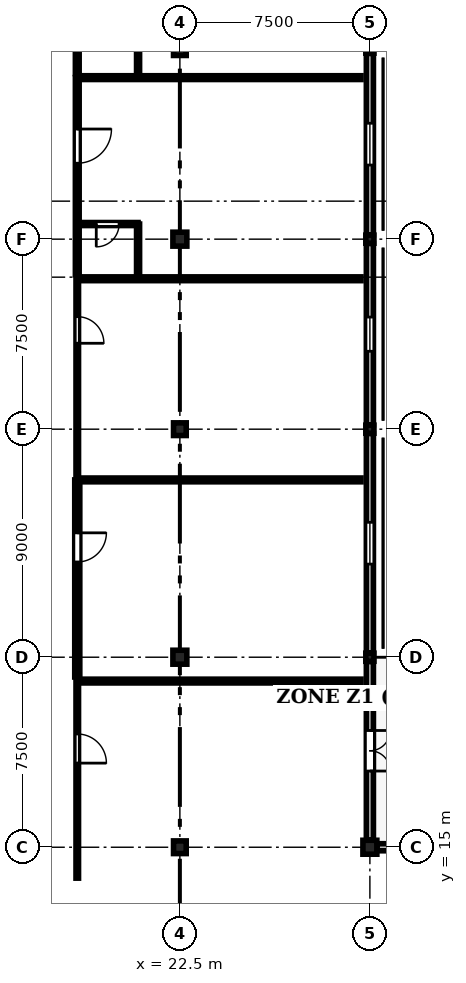
"""IFC4 building model, lengths in metres.
Left out: names, types, materials, properties, quantities, classifications, styles, units other than length and angle.
Written with IfcOpenShell. Run it as: python <this file> out.ifc"""

import sys

from ifc_helpers import new_model, si_unit, direction, frame, frame_2d, origin, origin_2d, place, context, subcontext, project, spatial, rectangle, extrude, element, fill, save


model = new_model("IFC4")
c1 = context("Model", 3, precision=1e-05, world=origin(), true_north=direction((0.0, 1.0)))
c2 = subcontext(c1, "Body", "Model", "MODEL_VIEW")
j1 = project(units=[si_unit("LENGTHUNIT", "METRE"), si_unit("PLANEANGLEUNIT", "RADIAN")], contexts=[c1])
p1 = place(None, origin())
s1 = spatial("IfcSite", under=j1, at=p1, CompositionType="ELEMENT")
p2 = place(p1, origin())
s2 = spatial("IfcBuilding", under=s1, at=p2, CompositionType="ELEMENT")
p3 = place(p2, frame((0.0, 0.0, 25.95)))
s3 = spatial("IfcBuildingStorey", under=s2, at=p3, CompositionType="ELEMENT", Elevation=25.95)
p4 = place(p3, frame((22.5, 15.0, 0.0), z_axis=(0.0, 0.0, 1.0), x_axis=(1.0, 0.0, 0.0)))
e1 = element("IfcColumn", 1, at=p4, inside=s3, PredefinedType="COLUMN", context=c2, shape_type="SweptSolid", body=[
    extrude(rectangle(XDim=0.5, YDim=0.5, at=origin_2d()), origin(), (0.0, 0.0, 1.0), 4.05),
])
p5 = place(p3, frame((22.5, 22.5, 0.0), z_axis=(0.0, 0.0, 1.0), x_axis=(1.0, 0.0, 0.0)))
e2 = element("IfcColumn", 2, at=p5, inside=s3, PredefinedType="COLUMN", context=c2, shape_type="SweptSolid", body=[
    extrude(rectangle(XDim=0.55, YDim=0.55, at=origin_2d()), origin(), (0.0, 0.0, 1.0), 4.05),
])
p6 = place(p3, frame((22.5, 31.5, 0.0), z_axis=(0.0, 0.0, 1.0), x_axis=(1.0, 0.0, 0.0)))
e3 = element("IfcColumn", 3, at=p6, inside=s3, PredefinedType="COLUMN", context=c2, shape_type="SweptSolid", body=[
    extrude(rectangle(XDim=0.5, YDim=0.5, at=origin_2d()), origin(), (0.0, 0.0, 1.0), 4.05),
])
p7 = place(p3, frame((22.5, 39.0, 0.0), z_axis=(0.0, 0.0, 1.0), x_axis=(1.0, 0.0, 0.0)))
e4 = element("IfcColumn", 4, at=p7, inside=s3, PredefinedType="COLUMN", context=c2, shape_type="SweptSolid", body=[
    extrude(rectangle(XDim=0.55, YDim=0.55, at=origin_2d()), origin(), (0.0, 0.0, 1.0), 4.05),
])
p8 = place(p3, frame((22.5, 46.5, 0.0), z_axis=(0.0, 0.0, 1.0), x_axis=(1.0, 0.0, 0.0)))
e5 = element("IfcColumn", 5, at=p8, inside=s3, PredefinedType="COLUMN", context=c2, shape_type="SweptSolid", body=[
    extrude(rectangle(XDim=0.5, YDim=0.5, at=origin_2d()), origin(), (0.0, 0.0, 1.0), 4.05),
])
p9 = place(p3, frame((30.0, 15.0, 0.0), z_axis=(0.0, 0.0, 1.0), x_axis=(1.0, 0.0, 0.0)))
e6 = element("IfcColumn", 6, at=p9, inside=s3, PredefinedType="COLUMN", context=c2, shape_type="SweptSolid", body=[
    extrude(rectangle(XDim=0.55, YDim=0.55, at=origin_2d()), origin(), (0.0, 0.0, 1.0), 4.05),
])
for number, where, z_axis, x_axis in (
    (7, (30.0, 22.5, 0.0), (0.0, 0.0, 1.0), (1.0, 0.0, 0.0)),
    (8, (30.0, 31.5, 0.0), (0.0, 0.0, 1.0), (1.0, 0.0, 0.0)),
    (9, (30.0, 39.0, 0.0), (0.0, 0.0, 1.0), (1.0, 0.0, 0.0)),
    (10, (30.0, 46.5, 0.0), (0.0, 0.0, 1.0), (1.0, 0.0, 0.0)),
):
    element("IfcColumn", number, at=place(p3, frame(where, z_axis=z_axis, x_axis=x_axis)), inside=s3, PredefinedType="COLUMN", context=c2, shape_type="SweptSolid", body=[
        extrude(rectangle(XDim=0.32, YDim=0.32, at=origin_2d()), origin(), (0.0, 0.0, 1.0), 4.05),
    ])
p10 = place(p3, frame((30.0, 22.33, 0.0), z_axis=(0.0, 0.0, 1.0), x_axis=(0.0, -1.0, 0.0)))
e11 = element("IfcWall", 11, at=p10, inside=s3, PredefinedType="STANDARD", context=c2, shape_type="SweptSolid", body=[
    extrude(rectangle(XDim=7.045, YDim=0.28, at=frame_2d((3.522, 0.0))), origin(), (0.0, 0.0, 1.0), 3.17),
])
p11 = place(p10, frame((2.722, 0.0, 0.0)))
e12 = element("IfcOpeningElement", 12, at=p11, cuts=e11, PredefinedType="OPENING", context=c2, shape_type="SweptSolid", body=[
    extrude(rectangle(XDim=1.6, YDim=2.35, at=frame_2d((0.8, 1.175))), frame((0.0, 0.15, 0.0), z_axis=(0.0, -1.0, 0.0), x_axis=(1.0, 0.0, 0.0)), (0.0, 0.0, 1.0), 0.3),
])
p12 = place(p3, frame((30.0, 31.33, 0.0), z_axis=(0.0, 0.0, 1.0), x_axis=(0.0, -1.0, 0.0)))
e13 = element("IfcWall", 13, at=p12, inside=s3, PredefinedType="STANDARD", context=c2, shape_type="SweptSolid", body=[
    extrude(rectangle(XDim=8.66, YDim=0.28, at=frame_2d((4.33, 0.0))), origin(), (0.0, 0.0, 1.0), 3.22),
])
p13 = place(p12, frame((3.505, 0.0, 0.85)))
e14 = element("IfcOpeningElement", 14, at=p13, cuts=e13, PredefinedType="OPENING", context=c2, shape_type="SweptSolid", body=[
    extrude(rectangle(XDim=1.65, YDim=2.09, at=frame_2d((0.825, 1.045))), frame((0.0, 0.15, 0.0), z_axis=(0.0, -1.0, 0.0), x_axis=(1.0, 0.0, 0.0)), (0.0, 0.0, 1.0), 0.3),
])
p14 = place(p3, frame((30.0, 38.83, 0.0), z_axis=(0.0, 0.0, 1.0), x_axis=(0.0, -1.0, 0.0)))
e15 = element("IfcWall", 15, at=p14, inside=s3, PredefinedType="STANDARD", context=c2, shape_type="SweptSolid", body=[
    extrude(rectangle(XDim=7.16, YDim=0.28, at=frame_2d((3.58, 0.0))), origin(), (0.0, 0.0, 1.0), 3.17),
])
p15 = place(p14, frame((2.905, 0.0, 0.85)))
e16 = element("IfcOpeningElement", 16, at=p15, cuts=e15, PredefinedType="OPENING", context=c2, shape_type="SweptSolid", body=[
    extrude(rectangle(XDim=1.35, YDim=2.04, at=frame_2d((0.675, 1.02))), frame((0.0, 0.15, 0.0), z_axis=(0.0, -1.0, 0.0), x_axis=(1.0, 0.0, 0.0)), (0.0, 0.0, 1.0), 0.3),
])
p16 = place(p3, frame((30.0, 46.33, 0.0), z_axis=(0.0, 0.0, 1.0), x_axis=(0.0, -1.0, 0.0)))
e17 = element("IfcWall", 17, at=p16, inside=s3, PredefinedType="STANDARD", context=c2, shape_type="SweptSolid", body=[
    extrude(rectangle(XDim=7.16, YDim=0.28, at=frame_2d((3.58, 0.0))), origin(), (0.0, 0.0, 1.0), 3.17),
])
p17 = place(p16, frame((2.755, 0.0, 0.85)))
e18 = element("IfcOpeningElement", 18, at=p17, cuts=e17, PredefinedType="OPENING", context=c2, shape_type="SweptSolid", body=[
    extrude(rectangle(XDim=1.65, YDim=2.04, at=frame_2d((0.825, 1.02))), frame((0.0, 0.15, 0.0), z_axis=(0.0, -1.0, 0.0), x_axis=(1.0, 0.0, 0.0)), (0.0, 0.0, 1.0), 0.3),
])
p18 = place(p3, frame((30.285, 15.0, 0.0), z_axis=(0.0, 0.0, 1.0), x_axis=(1.0, 0.0, 0.0)))
e19 = element("IfcWall", 19, at=p18, inside=s3, PredefinedType="STANDARD", context=c2, shape_type="SweptSolid", body=[
    extrude(rectangle(XDim=6.98, YDim=0.28, at=frame_2d((3.49, 0.0))), origin(), (0.0, 0.0, 1.0), 3.17),
])
p19 = place(p18, frame((2.69, 0.0, 0.0)))
e20 = element("IfcOpeningElement", 20, at=p19, cuts=e19, PredefinedType="OPENING", context=c2, shape_type="SweptSolid", body=[
    extrude(rectangle(XDim=1.6, YDim=2.35, at=frame_2d((0.8, 1.175))), frame((0.0, 0.15, 0.0), z_axis=(0.0, -1.0, 0.0), x_axis=(1.0, 0.0, 0.0)), (0.0, 0.0, 1.0), 0.3),
])
p20 = place(p3, frame((18.45, 21.559, 0.0), z_axis=(0.0, 0.0, 1.0), x_axis=(0.0, -1.0, 0.0)))
e21 = element("IfcWall", 21, at=p20, inside=s3, PredefinedType="PARTITIONING", context=c2, shape_type="SweptSolid", body=[
    extrude(rectangle(XDim=7.779, YDim=0.1, at=frame_2d((3.889, 0.0))), origin(), (0.0, 0.0, 1.0), 3.755),
])
p21 = place(p20, frame((2.089, 0.0, 0.0)))
e22 = element("IfcOpeningElement", 22, at=p21, cuts=e21, PredefinedType="OPENING", context=c2, shape_type="SweptSolid", body=[
    extrude(rectangle(XDim=1.15, YDim=2.2, at=frame_2d((0.575, 1.1))), frame((0.0, 0.06, 0.0), z_axis=(0.0, -1.0, 0.0), x_axis=(1.0, 0.0, 0.0)), (0.0, 0.0, 1.0), 0.12),
])
p22 = place(p3, frame((18.45, 29.498, 0.0), z_axis=(0.0, 0.0, 1.0), x_axis=(0.0, -1.0, 0.0)))
e23 = element("IfcWall", 23, at=p22, inside=s3, PredefinedType="STANDARD", context=c2, shape_type="SweptSolid", body=[
    extrude(rectangle(XDim=7.779, YDim=0.2, at=frame_2d((3.889, 0.0))), origin(), (0.0, 0.0, 1.0), 3.355),
])
p23 = place(p22, frame((2.089, 0.0, 0.0)))
e24 = element("IfcOpeningElement", 24, at=p23, cuts=e23, PredefinedType="OPENING", context=c2, shape_type="SweptSolid", body=[
    extrude(rectangle(XDim=1.15, YDim=2.2, at=frame_2d((0.575, 1.1))), frame((0.0, 0.11, 0.0), z_axis=(0.0, -1.0, 0.0), x_axis=(1.0, 0.0, 0.0)), (0.0, 0.0, 1.0), 0.22),
])
p24 = place(p3, frame((18.45, 37.437, 0.0), z_axis=(0.0, 0.0, 1.0), x_axis=(0.0, -1.0, 0.0)))
e25 = element("IfcWall", 25, at=p24, inside=s3, PredefinedType="PARTITIONING", context=c2, shape_type="SweptSolid", body=[
    extrude(rectangle(XDim=7.779, YDim=0.1, at=frame_2d((3.89, 0.0))), origin(), (0.0, 0.0, 1.0), 3.355),
])
p25 = place(p24, frame((1.496, 0.0, 0.0)))
e26 = element("IfcOpeningElement", 26, at=p25, cuts=e25, PredefinedType="OPENING", context=c2, shape_type="SweptSolid", body=[
    extrude(rectangle(XDim=1.05, YDim=2.2, at=frame_2d((0.525, 1.1))), frame((0.0, 0.06, 0.0), z_axis=(0.0, -1.0, 0.0), x_axis=(1.0, 0.0, 0.0)), (0.0, 0.0, 1.0), 0.12),
])
p26 = place(p3, frame((18.45, 45.375, 0.0), z_axis=(0.0, 0.0, 1.0), x_axis=(0.0, -1.0, 0.0)))
e27 = element("IfcWall", 27, at=p26, inside=s3, PredefinedType="PARTITIONING", context=c2, shape_type="SweptSolid", body=[
    extrude(rectangle(XDim=7.779, YDim=0.15, at=frame_2d((3.889, 0.0))), origin(), (0.0, 0.0, 1.0), 3.755),
])
p27 = place(p26, frame((2.029, 0.0, 0.0)))
e28 = element("IfcOpeningElement", 28, at=p27, cuts=e27, PredefinedType="OPENING", context=c2, shape_type="SweptSolid", body=[
    extrude(rectangle(XDim=1.35, YDim=2.25, at=frame_2d((0.675, 1.125))), frame((0.0, 0.085, 0.0), z_axis=(0.0, -1.0, 0.0), x_axis=(1.0, 0.0, 0.0)), (0.0, 0.0, 1.0), 0.17),
])
p28 = place(p3, frame((20.85, 39.597, 0.0), z_axis=(0.0, 0.0, 1.0), x_axis=(-1.0, 0.0, 0.0)))
e29 = element("IfcWall", 29, at=p28, inside=s3, PredefinedType="PARTITIONING", context=c2, shape_type="SweptSolid", body=[
    extrude(rectangle(XDim=2.4, YDim=0.12, at=frame_2d((1.2, 0.0))), origin(), (0.0, 0.0, 1.0), 3.755),
])
p29 = place(p28, frame((0.75, 0.0, 0.0)))
e30 = element("IfcOpeningElement", 30, at=p29, cuts=e29, PredefinedType="OPENING", context=c2, shape_type="SweptSolid", body=[
    extrude(rectangle(XDim=0.9, YDim=2.1, at=frame_2d((0.45, 1.05))), frame((0.0, 0.07, 0.0), z_axis=(0.0, -1.0, 0.0), x_axis=(1.0, 0.0, 0.0)), (0.0, 0.0, 1.0), 0.14),
])
p30 = place(p3, frame((20.85, 37.597, 0.0), z_axis=(0.0, 0.0, 1.0), x_axis=(0.0, 1.0, 0.0)))
e31 = element("IfcWall", 31, at=p30, inside=s3, PredefinedType="PARTITIONING", context=c2, shape_type="SweptSolid", body=[
    extrude(rectangle(XDim=2.0, YDim=0.12, at=frame_2d((1.0, 0.0))), origin(), (0.0, 0.0, 1.0), 3.755),
])
p31 = place(p3, frame((18.45, 53.314, 0.0), z_axis=(0.0, 0.0, 1.0), x_axis=(0.0, -1.0, 0.0)))
e32 = element("IfcWall", 32, at=p31, inside=s3, PredefinedType="PARTITIONING", context=c2, shape_type="SweptSolid", body=[
    extrude(rectangle(XDim=7.779, YDim=0.15, at=frame_2d((3.889, 0.0))), origin(), (0.0, 0.0, 1.0), 3.755),
])
p32 = place(p31, frame((2.622, 0.0, 0.0)))
e33 = element("IfcOpeningElement", 33, at=p32, cuts=e32, PredefinedType="OPENING", context=c2, shape_type="SweptSolid", body=[
    extrude(rectangle(XDim=1.35, YDim=2.25, at=frame_2d((0.675, 1.125))), frame((0.0, 0.085, 0.0), z_axis=(0.0, -1.0, 0.0), x_axis=(1.0, 0.0, 0.0)), (0.0, 0.0, 1.0), 0.17),
])
p33 = place(p3, frame((20.85, 45.536, 0.0), z_axis=(0.0, 0.0, 1.0), x_axis=(0.0, 1.0, 0.0)))
e34 = element("IfcWall", 34, at=p33, inside=s3, PredefinedType="PARTITIONING", context=c2, shape_type="SweptSolid", body=[
    extrude(rectangle(XDim=2.0, YDim=0.12, at=frame_2d((1.0, 0.0))), origin(), (0.0, 0.0, 1.0), 3.755),
])
for number, where, z_axis, x_axis in (
    (35, (18.45, 21.559, 0.0), (0.0, 0.0, 1.0), (1.0, 0.0, 0.0)),
    (36, (18.45, 29.498, 0.0), (0.0, 0.0, 1.0), (1.0, 0.0, 0.0)),
    (37, (18.45, 37.437, 0.0), (0.0, 0.0, 1.0), (1.0, 0.0, 0.0)),
    (38, (18.45, 45.375, 0.0), (0.0, 0.0, 1.0), (1.0, 0.0, 0.0)),
):
    element("IfcWall", number, at=place(p3, frame(where, z_axis=z_axis, x_axis=x_axis)), inside=s3, PredefinedType="PARTITIONING", context=c2, shape_type="SweptSolid", body=[
        extrude(rectangle(XDim=11.2, YDim=0.15, at=frame_2d((5.6, 0.0))), origin(), (0.0, 0.0, 1.0), 3.755),
    ])
p34 = place(p11, origin())
e39 = element("IfcDoor", 39, at=p34, inside=s3, OperationType="DOUBLE_DOOR_SINGLE_SWING", PredefinedType="DOOR", context=c2, shape_type="SweptSolid", body=[
    extrude(rectangle(XDim=1.6, YDim=2.35, at=frame_2d((0.8, 1.175))), frame((0.0, 0.025, 0.0), z_axis=(0.0, -1.0, 0.0), x_axis=(1.0, 0.0, 0.0)), (0.0, 0.0, 1.0), 0.05),
])
fill(e12, e39)
p35 = place(p13, origin())
e40 = element("IfcWindow", 40, at=p35, inside=s3, PartitioningType="SINGLE_PANEL", PredefinedType="WINDOW", context=c2, shape_type="SweptSolid", body=[
    extrude(rectangle(XDim=1.65, YDim=2.09, at=frame_2d((0.825, 1.045))), frame((0.0, 0.03, 0.0), z_axis=(0.0, -1.0, 0.0), x_axis=(1.0, 0.0, 0.0)), (0.0, 0.0, 1.0), 0.06),
])
fill(e14, e40)
p36 = place(p15, origin())
e41 = element("IfcWindow", 41, at=p36, inside=s3, PartitioningType="SINGLE_PANEL", PredefinedType="WINDOW", context=c2, shape_type="SweptSolid", body=[
    extrude(rectangle(XDim=1.35, YDim=2.04, at=frame_2d((0.675, 1.02))), frame((0.0, 0.03, 0.0), z_axis=(0.0, -1.0, 0.0), x_axis=(1.0, 0.0, 0.0)), (0.0, 0.0, 1.0), 0.06),
])
fill(e16, e41)
p37 = place(p17, origin())
e42 = element("IfcWindow", 42, at=p37, inside=s3, PartitioningType="SINGLE_PANEL", PredefinedType="WINDOW", context=c2, shape_type="SweptSolid", body=[
    extrude(rectangle(XDim=1.65, YDim=2.04, at=frame_2d((0.825, 1.02))), frame((0.0, 0.03, 0.0), z_axis=(0.0, -1.0, 0.0), x_axis=(1.0, 0.0, 0.0)), (0.0, 0.0, 1.0), 0.06),
])
fill(e18, e42)
p38 = place(p21, origin())
e43 = element("IfcDoor", 43, at=p38, inside=s3, OperationType="SINGLE_SWING_RIGHT", PredefinedType="DOOR", context=c2, shape_type="SweptSolid", body=[
    extrude(rectangle(XDim=1.15, YDim=2.2, at=frame_2d((0.575, 1.1))), frame((0.0, 0.025, 0.0), z_axis=(0.0, -1.0, 0.0), x_axis=(1.0, 0.0, 0.0)), (0.0, 0.0, 1.0), 0.05),
])
fill(e22, e43)
p39 = place(p23, origin())
e44 = element("IfcDoor", 44, at=p39, inside=s3, OperationType="SINGLE_SWING_LEFT", PredefinedType="DOOR", context=c2, shape_type="SweptSolid", body=[
    extrude(rectangle(XDim=1.15, YDim=2.2, at=frame_2d((0.575, 1.1))), frame((0.0, 0.025, 0.0), z_axis=(0.0, -1.0, 0.0), x_axis=(1.0, 0.0, 0.0)), (0.0, 0.0, 1.0), 0.05),
])
fill(e24, e44)
p40 = place(p25, origin())
e45 = element("IfcDoor", 45, at=p40, inside=s3, OperationType="SINGLE_SWING_RIGHT", PredefinedType="DOOR", context=c2, shape_type="SweptSolid", body=[
    extrude(rectangle(XDim=1.05, YDim=2.2, at=frame_2d((0.525, 1.1))), frame((0.0, 0.025, 0.0), z_axis=(0.0, -1.0, 0.0), x_axis=(1.0, 0.0, 0.0)), (0.0, 0.0, 1.0), 0.05),
])
fill(e26, e45)
p41 = place(p27, origin())
e46 = element("IfcDoor", 46, at=p41, inside=s3, OperationType="SINGLE_SWING_LEFT", PredefinedType="DOOR", context=c2, shape_type="SweptSolid", body=[
    extrude(rectangle(XDim=1.35, YDim=2.25, at=frame_2d((0.675, 1.125))), frame((0.0, 0.025, 0.0), z_axis=(0.0, -1.0, 0.0), x_axis=(1.0, 0.0, 0.0)), (0.0, 0.0, 1.0), 0.05),
])
fill(e28, e46)
p42 = place(p29, origin())
e47 = element("IfcDoor", 47, at=p42, inside=s3, OperationType="SINGLE_SWING_RIGHT", PredefinedType="DOOR", context=c2, shape_type="SweptSolid", body=[
    extrude(rectangle(XDim=0.9, YDim=2.1, at=frame_2d((0.45, 1.05))), frame((0.0, 0.025, 0.0), z_axis=(0.0, -1.0, 0.0), x_axis=(1.0, 0.0, 0.0)), (0.0, 0.0, 1.0), 0.05),
])
fill(e30, e47)
save(model, sys.argv[1])
